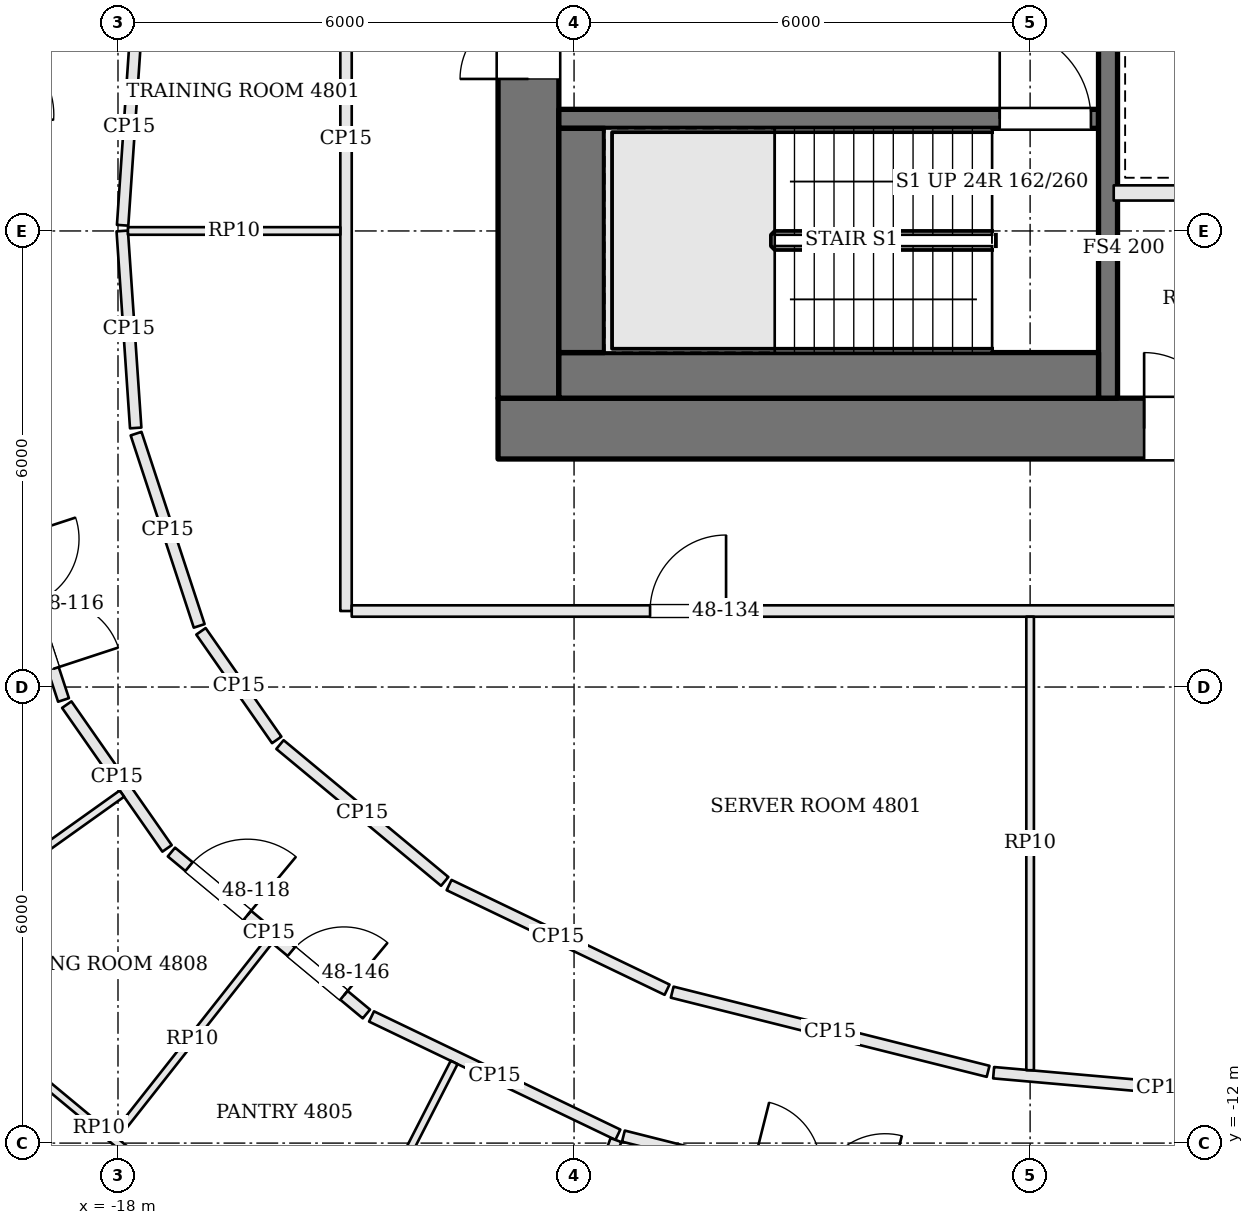
"""IFC4 building model, lengths in metres.
Left out: names, types, materials, properties, quantities, classifications, styles, units other than length and angle.
Written with IfcOpenShell. Run it as: python <this file> out.ifc"""

import sys

from ifc_helpers import new_model, si_unit, direction, frame, frame_2d, origin, place, context, subcontext, project, spatial, rectangle, extrude, element, fill, save


model = new_model("IFC4")
c1 = context("Model", 3, precision=1e-05, world=origin(), true_north=direction((0.0, 1.0)))
c2 = subcontext(c1, "Body", "Model", "MODEL_VIEW")
j1 = project(units=[si_unit("LENGTHUNIT", "METRE"), si_unit("PLANEANGLEUNIT", "RADIAN")], contexts=[c1])
p1 = place(None, origin())
s1 = spatial("IfcSite", under=j1, at=p1, CompositionType="ELEMENT")
p2 = place(p1, origin())
s2 = spatial("IfcBuilding", under=s1, at=p2, CompositionType="ELEMENT")
p3 = place(p2, frame((0.0, 0.0, 197.4)))
s3 = spatial("IfcBuildingStorey", under=s2, at=p3, CompositionType="ELEMENT", Elevation=197.4)
p4 = place(p3, frame((-13.0, -2.6, 0.0), z_axis=(0.0, 0.0, 1.0), x_axis=(1.0, 0.0, 0.0)))
e1 = element("IfcWall", 1, at=p4, inside=s3, PredefinedType="SHEAR", context=c2, shape_type="SweptSolid", body=[
    extrude(rectangle(XDim=26.0, YDim=0.8, at=frame_2d((13.0, 0.0))), origin(), (0.0, 0.0, 1.0), 3.9),
])
p5 = place(p4, frame((8.5, 0.0, 0.0)))
e2 = element("IfcOpeningElement", 2, at=p5, cuts=e1, PredefinedType="OPENING", context=c2, shape_type="SweptSolid", body=[
    extrude(rectangle(XDim=1.0, YDim=2.1, at=frame_2d((0.5, 1.05))), frame((0.0, 0.41, 0.0), z_axis=(0.0, -1.0, 0.0), x_axis=(1.0, 0.0, 0.0)), (0.0, 0.0, 1.0), 0.82),
])
p6 = place(p4, frame((11.025, 0.0, 0.0)))
e3 = element("IfcOpeningElement", 3, at=p6, cuts=e1, PredefinedType="OPENING", context=c2, shape_type="SweptSolid", body=[
    extrude(rectangle(XDim=0.9, YDim=2.1, at=frame_2d((0.45, 1.05))), frame((0.0, 0.41, 0.0), z_axis=(0.0, -1.0, 0.0), x_axis=(1.0, 0.0, 0.0)), (0.0, 0.0, 1.0), 0.82),
])
p7 = place(p4, frame((14.225, 0.0, 0.0)))
e4 = element("IfcOpeningElement", 4, at=p7, cuts=e1, PredefinedType="OPENING", context=c2, shape_type="SweptSolid", body=[
    extrude(rectangle(XDim=0.9, YDim=2.1, at=frame_2d((0.45, 1.05))), frame((0.0, 0.41, 0.0), z_axis=(0.0, -1.0, 0.0), x_axis=(1.0, 0.0, 0.0)), (0.0, 0.0, 1.0), 0.82),
])
p8 = place(p4, frame((16.6, 0.0, 0.0)))
e5 = element("IfcOpeningElement", 5, at=p8, cuts=e1, PredefinedType="OPENING", context=c2, shape_type="SweptSolid", body=[
    extrude(rectangle(XDim=1.0, YDim=2.1, at=frame_2d((0.5, 1.05))), frame((0.0, 0.41, 0.0), z_axis=(0.0, -1.0, 0.0), x_axis=(1.0, 0.0, 0.0)), (0.0, 0.0, 1.0), 0.82),
])
p9 = place(p3, frame((-12.6, -2.2, 0.0), z_axis=(0.0, 0.0, 1.0), x_axis=(0.0, 1.0, 0.0)))
e6 = element("IfcWall", 6, at=p9, inside=s3, PredefinedType="SHEAR", context=c2, shape_type="SweptSolid", body=[
    extrude(rectangle(XDim=13.4, YDim=0.8, at=frame_2d((6.7, 0.0))), origin(), (0.0, 0.0, 1.0), 3.9),
])
p10 = place(p9, frame((4.2, 0.0, 0.0)))
e7 = element("IfcOpeningElement", 7, at=p10, cuts=e6, PredefinedType="OPENING", context=c2, shape_type="SweptSolid", body=[
    extrude(rectangle(XDim=1.8, YDim=2.1, at=frame_2d((0.9, 1.05))), frame((0.0, 0.41, 0.0), z_axis=(0.0, -1.0, 0.0), x_axis=(1.0, 0.0, 0.0)), (0.0, 0.0, 1.0), 0.82),
])
p11 = place(p3, frame((-12.2, 1.475, 0.0), z_axis=(0.0, 0.0, 1.0), x_axis=(1.0, 0.0, 0.0)))
e8 = element("IfcWall", 8, at=p11, inside=s3, PredefinedType="SOLIDWALL", context=c2, shape_type="SweptSolid", body=[
    extrude(rectangle(XDim=7.1, YDim=0.25, at=frame_2d((3.55, 0.0))), origin(), (0.0, 0.0, 1.0), 3.7),
])
p12 = place(p11, frame((5.8, 0.0, 0.0)))
e9 = element("IfcOpeningElement", 9, at=p12, cuts=e8, PredefinedType="OPENING", context=c2, shape_type="SweptSolid", body=[
    extrude(rectangle(XDim=1.2, YDim=2.1, at=frame_2d((0.6, 1.05))), frame((0.0, 0.135, 0.0), z_axis=(0.0, -1.0, 0.0), x_axis=(1.0, 0.0, 0.0)), (0.0, 0.0, 1.0), 0.27),
])
p13 = place(p3, frame((-4.975, -2.2, 0.0), z_axis=(0.0, 0.0, 1.0), x_axis=(0.0, 1.0, 0.0)))
e10 = element("IfcWall", 10, at=p13, inside=s3, PredefinedType="SOLIDWALL", context=c2, shape_type="SweptSolid", body=[
    extrude(rectangle(XDim=13.4, YDim=0.25, at=frame_2d((6.7, 0.0))), origin(), (0.0, 0.0, 1.0), 3.7),
])
p14 = place(p13, frame((5.25, 0.0, 0.0)))
e11 = element("IfcOpeningElement", 11, at=p14, cuts=e10, PredefinedType="OPENING", context=c2, shape_type="SweptSolid", body=[
    extrude(rectangle(XDim=1.2, YDim=2.1, at=frame_2d((0.6, 1.05))), frame((0.0, 0.135, 0.0), z_axis=(0.0, -1.0, 0.0), x_axis=(1.0, 0.0, 0.0)), (0.0, 0.0, 1.0), 0.27),
])
p15 = place(p3, frame((-12.2, -1.9, 0.0), z_axis=(0.0, 0.0, 1.0), x_axis=(1.0, 0.0, 0.0)))
e12 = element("IfcWall", 12, at=p15, inside=s3, PredefinedType="SOLIDWALL", context=c2, shape_type="SweptSolid", body=[
    extrude(rectangle(XDim=7.1, YDim=0.6, at=frame_2d((3.55, 0.0))), origin(), (0.0, 0.0, 1.0), 3.7),
])
p16 = place(p3, frame((-11.9, -1.6, 0.0), z_axis=(0.0, 0.0, 1.0), x_axis=(0.0, 1.0, 0.0)))
e13 = element("IfcWall", 13, at=p16, inside=s3, PredefinedType="SOLIDWALL", context=c2, shape_type="SweptSolid", body=[
    extrude(rectangle(XDim=2.95, YDim=0.6, at=frame_2d((1.475, 0.0))), origin(), (0.0, 0.0, 1.0), 3.7),
])
p17 = place(p3, frame((-4.9, 0.5, 0.0), z_axis=(0.0, 0.0, 1.0), x_axis=(1.0, 0.0, 0.0)))
e14 = element("IfcWall", 14, at=p17, inside=s3, PredefinedType="SOLIDWALL", context=c2, shape_type="SweptSolid", body=[
    extrude(rectangle(XDim=9.8, YDim=0.2, at=frame_2d((4.9, 0.0))), origin(), (0.0, 0.0, 1.0), 3.7),
])
p18 = place(p3, frame((-19.677, -3.243, 0.0), z_axis=(0.0, 0.0, 1.0), x_axis=(0.311873272737, -0.950123708657, 0.0)))
e15 = element("IfcWall", 15, at=p18, inside=s3, PredefinedType="PARTITIONING", context=c2, shape_type="SweptSolid", body=[
    extrude(rectangle(XDim=3.08, YDim=0.15, at=frame_2d((1.54, 0.0))), origin(), (0.0, 0.0, 1.0), 3.084),
])
p19 = place(p18, frame((0.85, 0.0, 0.0)))
e16 = element("IfcOpeningElement", 16, at=p19, cuts=e15, PredefinedType="OPENING", context=c2, shape_type="SweptSolid", body=[
    extrude(rectangle(XDim=1.8, YDim=2.1, at=frame_2d((0.9, 1.05))), frame((0.0, 0.085, 0.0), z_axis=(0.0, -1.0, 0.0), x_axis=(1.0, 0.0, 0.0)), (0.0, 0.0, 1.0), 0.17),
])
p20 = place(p3, frame((-18.674, -6.232, 0.0), z_axis=(0.0, 0.0, 1.0), x_axis=(0.572118665737, -0.820170855563, 0.0)))
e17 = element("IfcWall", 17, at=p20, inside=s3, PredefinedType="PARTITIONING", context=c2, shape_type="SweptSolid", body=[
    extrude(rectangle(XDim=2.306, YDim=0.15, at=frame_2d((1.153, 0.0))), origin(), (0.0, 0.0, 1.0), 3.084),
])
p21 = place(p3, frame((-17.297, -8.171, 0.0), z_axis=(0.0, 0.0, 1.0), x_axis=(0.769228575061, -0.638973707839, 0.0)))
e18 = element("IfcWall", 18, at=p21, inside=s3, PredefinedType="PARTITIONING", context=c2, shape_type="SweptSolid", body=[
    extrude(rectangle(XDim=3.334, YDim=0.15, at=frame_2d((1.667, 0.0))), origin(), (0.0, 0.0, 1.0), 3.084),
])
p22 = place(p21, frame((0.3, 0.0, 0.0)))
e19 = element("IfcOpeningElement", 19, at=p22, cuts=e18, PredefinedType="OPENING", context=c2, shape_type="SweptSolid", body=[
    extrude(rectangle(XDim=1.0, YDim=2.4, at=frame_2d((0.5, 1.2))), frame((0.0, 0.085, 0.0), z_axis=(0.0, -1.0, 0.0), x_axis=(1.0, 0.0, 0.0)), (0.0, 0.0, 1.0), 0.17),
])
p23 = place(p21, frame((2.05, 0.0, 0.0)))
e20 = element("IfcOpeningElement", 20, at=p23, cuts=e18, PredefinedType="OPENING", context=c2, shape_type="SweptSolid", body=[
    extrude(rectangle(XDim=0.9, YDim=2.1, at=frame_2d((0.45, 1.05))), frame((0.0, 0.085, 0.0), z_axis=(0.0, -1.0, 0.0), x_axis=(1.0, 0.0, 0.0)), (0.0, 0.0, 1.0), 0.17),
])
p24 = place(p3, frame((-14.664, -10.334, 0.0), z_axis=(0.0, 0.0, 1.0), x_axis=(0.901523057468, -0.432731067585, 0.0)))
e21 = element("IfcWall", 21, at=p24, inside=s3, PredefinedType="PARTITIONING", context=c2, shape_type="SweptSolid", body=[
    extrude(rectangle(XDim=3.595, YDim=0.15, at=frame_2d((1.797, 0.0))), origin(), (0.0, 0.0, 1.0), 3.084),
])
p25 = place(p3, frame((-14.301, -19.789, 0.0), z_axis=(0.0, 0.0, 1.0), x_axis=(0.34224178248, 0.939611921128, 0.0)))
e22 = element("IfcWall", 22, at=p25, inside=s3, PredefinedType="PARTITIONING", context=c2, shape_type="SweptSolid", body=[
    extrude(rectangle(XDim=8.332, YDim=0.15, at=frame_2d((4.166, 0.0))), origin(), (0.0, 0.0, 1.0), 3.084),
])
p26 = place(p3, frame((-11.351, -11.908, 0.0), z_axis=(0.0, 0.0, 1.0), x_axis=(0.969630935796, -0.244572787421, 0.0)))
e23 = element("IfcWall", 23, at=p26, inside=s3, PredefinedType="PARTITIONING", context=c2, shape_type="SweptSolid", body=[
    extrude(rectangle(XDim=4.68, YDim=0.15, at=frame_2d((2.34, 0.0))), origin(), (0.0, 0.0, 1.0), 3.084),
])
p27 = place(p26, frame((1.751, 0.0, 0.0)))
e24 = element("IfcOpeningElement", 24, at=p27, cuts=e23, PredefinedType="OPENING", context=c2, shape_type="SweptSolid", body=[
    extrude(rectangle(XDim=1.8, YDim=2.1, at=frame_2d((0.9, 1.05))), frame((0.0, 0.085, 0.0), z_axis=(0.0, -1.0, 0.0), x_axis=(1.0, 0.0, 0.0)), (0.0, 0.0, 1.0), 0.17),
])
p28 = place(p3, frame((-2.039, -11.465, 0.0), z_axis=(0.0, 0.0, 1.0), x_axis=(-0.996139855484, 0.087780341286, 0.0)))
e25 = element("IfcWall", 25, at=p28, inside=s3, PredefinedType="PARTITIONING", context=c2, shape_type="SweptSolid", body=[
    extrude(rectangle(XDim=4.458, YDim=0.15, at=frame_2d((2.229, 0.0))), origin(), (0.0, 0.0, 1.0), 3.084),
])
p29 = place(p3, frame((-6.553, -11.056, 0.0), z_axis=(0.0, 0.0, 1.0), x_axis=(-0.970004917182, 0.243085294995, 0.0)))
e26 = element("IfcWall", 26, at=p29, inside=s3, PredefinedType="PARTITIONING", context=c2, shape_type="SweptSolid", body=[
    extrude(rectangle(XDim=4.284, YDim=0.15, at=frame_2d((2.142, 0.0))), origin(), (0.0, 0.0, 1.0), 3.084),
])
p30 = place(p3, frame((-10.776, -9.982, 0.0), z_axis=(0.0, 0.0, 1.0), x_axis=(-0.901511079436, 0.432756020933, 0.0)))
e27 = element("IfcWall", 27, at=p30, inside=s3, PredefinedType="PARTITIONING", context=c2, shape_type="SweptSolid", body=[
    extrude(rectangle(XDim=3.181, YDim=0.15, at=frame_2d((1.59, 0.0))), origin(), (0.0, 0.0, 1.0), 3.084),
])
p31 = place(p3, frame((-13.702, -8.557, 0.0), z_axis=(0.0, 0.0, 1.0), x_axis=(-0.769221825067, 0.638981833733, 0.0)))
e28 = element("IfcWall", 28, at=p31, inside=s3, PredefinedType="PARTITIONING", context=c2, shape_type="SweptSolid", body=[
    extrude(rectangle(XDim=2.817, YDim=0.15, at=frame_2d((1.409, 0.0))), origin(), (0.0, 0.0, 1.0), 3.084),
])
p32 = place(p3, frame((-15.912, -6.696, 0.0), z_axis=(0.0, 0.0, 1.0), x_axis=(-0.572078533763, 0.820198848578, 0.0)))
e29 = element("IfcWall", 29, at=p32, inside=s3, PredefinedType="PARTITIONING", context=c2, shape_type="SweptSolid", body=[
    extrude(rectangle(XDim=1.742, YDim=0.15, at=frame_2d((0.871, 0.0))), origin(), (0.0, 0.0, 1.0), 3.084),
])
p33 = place(p3, frame((-16.932, -5.196, 0.0), z_axis=(0.0, 0.0, 1.0), x_axis=(-0.311904957484, 0.950113307715, 0.0)))
e30 = element("IfcWall", 30, at=p33, inside=s3, PredefinedType="PARTITIONING", context=c2, shape_type="SweptSolid", body=[
    extrude(rectangle(XDim=2.662, YDim=0.15, at=frame_2d((1.331, 0.0))), origin(), (0.0, 0.0, 1.0), 3.084),
])
p34 = place(p3, frame((-17.767, -2.592, 0.0), z_axis=(0.0, 0.0, 1.0), x_axis=(-0.068140828228, 0.997675712608, 0.0)))
e31 = element("IfcWall", 31, at=p34, inside=s3, PredefinedType="PARTITIONING", context=c2, shape_type="SweptSolid", body=[
    extrude(rectangle(XDim=2.598, YDim=0.15, at=frame_2d((1.299, 0.0))), origin(), (0.0, 0.0, 1.0), 3.084),
])
p35 = place(p3, frame((-17.939, 0.075, 0.0), z_axis=(0.0, 0.0, 1.0), x_axis=(0.068227980697, 0.997669756307, 0.0)))
e32 = element("IfcWall", 32, at=p35, inside=s3, PredefinedType="PARTITIONING", context=c2, shape_type="SweptSolid", body=[
    extrude(rectangle(XDim=2.598, YDim=0.15, at=frame_2d((1.299, 0.0))), origin(), (0.0, 0.0, 1.0), 3.084),
])
p36 = place(p3, frame((-15.0, 7.423, 0.0), z_axis=(0.0, 0.0, 1.0), x_axis=(0.0, -1.0, 0.0)))
e33 = element("IfcWall", 33, at=p36, inside=s3, PredefinedType="PARTITIONING", context=c2, shape_type="SweptSolid", body=[
    extrude(rectangle(XDim=12.423, YDim=0.15, at=frame_2d((6.211, 0.0))), origin(), (0.0, 0.0, 1.0), 3.084),
])
p37 = place(p36, frame((3.174, 0.0, 0.0)))
e34 = element("IfcOpeningElement", 34, at=p37, cuts=e33, PredefinedType="OPENING", context=c2, shape_type="SweptSolid", body=[
    extrude(rectangle(XDim=1.0, YDim=2.1, at=frame_2d((0.5, 1.05))), frame((0.0, 0.085, 0.0), z_axis=(0.0, -1.0, 0.0), x_axis=(1.0, 0.0, 0.0)), (0.0, 0.0, 1.0), 0.17),
])
p38 = place(p3, frame((-14.925, -5.0, 0.0), z_axis=(0.0, 0.0, 1.0), x_axis=(1.0, 0.0, 0.0)))
e35 = element("IfcWall", 35, at=p38, inside=s3, PredefinedType="PARTITIONING", context=c2, shape_type="SweptSolid", body=[
    extrude(rectangle(XDim=29.925, YDim=0.15, at=frame_2d((14.962, 0.0))), origin(), (0.0, 0.0, 1.0), 3.084),
])
p39 = place(p38, frame((3.925, 0.0, 0.0)))
e36 = element("IfcOpeningElement", 36, at=p39, cuts=e35, PredefinedType="OPENING", context=c2, shape_type="SweptSolid", body=[
    extrude(rectangle(XDim=1.0, YDim=2.1, at=frame_2d((0.5, 1.05))), frame((0.0, 0.085, 0.0), z_axis=(0.0, -1.0, 0.0), x_axis=(1.0, 0.0, 0.0)), (0.0, 0.0, 1.0), 0.17),
])
p40 = place(p38, frame((14.025, 0.0, 0.0)))
e37 = element("IfcOpeningElement", 37, at=p40, cuts=e35, PredefinedType="OPENING", context=c2, shape_type="SweptSolid", body=[
    extrude(rectangle(XDim=1.8, YDim=2.1, at=frame_2d((0.9, 1.05))), frame((0.0, 0.085, 0.0), z_axis=(0.0, -1.0, 0.0), x_axis=(1.0, 0.0, 0.0)), (0.0, 0.0, 1.0), 0.17),
])
p41 = place(p38, frame((24.925, 0.0, 0.0)))
e38 = element("IfcOpeningElement", 38, at=p41, cuts=e35, PredefinedType="OPENING", context=c2, shape_type="SweptSolid", body=[
    extrude(rectangle(XDim=1.0, YDim=2.1, at=frame_2d((0.5, 1.05))), frame((0.0, 0.085, 0.0), z_axis=(0.0, -1.0, 0.0), x_axis=(1.0, 0.0, 0.0)), (0.0, 0.0, 1.0), 0.17),
])
p42 = place(p3, frame((-16.62, -13.153, 0.0), z_axis=(0.0, 0.0, 1.0), x_axis=(-0.76922129881, 0.638982467253, 0.0)))
e39 = element("IfcWall", 39, at=p42, inside=s3, PredefinedType="PARTITIONING", context=c2, shape_type="SweptSolid", body=[
    extrude(rectangle(XDim=4.238, YDim=0.1, at=frame_2d((2.119, 0.0))), origin(), (0.0, 0.0, 1.0), 3.084),
])
p43 = place(p3, frame((-17.949, -7.403, 0.0), z_axis=(0.0, 0.0, 1.0), x_axis=(-0.814111063542, -0.58070920108, 0.0)))
e40 = element("IfcWall", 40, at=p43, inside=s3, PredefinedType="PARTITIONING", context=c2, shape_type="SweptSolid", body=[
    extrude(rectangle(XDim=3.275, YDim=0.1, at=frame_2d((1.638, 0.0))), origin(), (0.0, 0.0, 1.0), 3.084),
])
p44 = place(p3, frame((-16.009, -9.338, 0.0), z_axis=(0.0, 0.0, 1.0), x_axis=(-0.619071458302, -0.785334660839, 0.0)))
e41 = element("IfcWall", 41, at=p44, inside=s3, PredefinedType="PARTITIONING", context=c2, shape_type="SweptSolid", body=[
    extrude(rectangle(XDim=3.276, YDim=0.1, at=frame_2d((1.638, 0.0))), origin(), (0.0, 0.0, 1.0), 3.084),
])
p45 = place(p3, frame((-13.578, -10.939, 0.0), z_axis=(0.0, 0.0, 1.0), x_axis=(-0.455540357247, -0.890215132942, 0.0)))
e42 = element("IfcWall", 42, at=p45, inside=s3, PredefinedType="PARTITIONING", context=c2, shape_type="SweptSolid", body=[
    extrude(rectangle(XDim=3.276, YDim=0.1, at=frame_2d((1.638, 0.0))), origin(), (0.0, 0.0, 1.0), 3.084),
])
p46 = place(p3, frame((-6.0, -11.041, 0.0), z_axis=(0.0, 0.0, 1.0), x_axis=(0.0, 1.0, 0.0)))
e43 = element("IfcWall", 43, at=p46, inside=s3, PredefinedType="PARTITIONING", context=c2, shape_type="SweptSolid", body=[
    extrude(rectangle(XDim=5.966, YDim=0.1, at=frame_2d((2.983, 0.0))), origin(), (0.0, 0.0, 1.0), 3.084),
])
p47 = place(p3, frame((-17.869, 0.0, 0.0), z_axis=(0.0, 0.0, 1.0), x_axis=(1.0, 0.0, 0.0)))
e44 = element("IfcWall", 44, at=p47, inside=s3, PredefinedType="PARTITIONING", context=c2, shape_type="SweptSolid", body=[
    extrude(rectangle(XDim=2.794, YDim=0.1, at=frame_2d((1.397, 0.0))), origin(), (0.0, 0.0, 1.0), 3.084),
])
p48 = place(p10, origin())
e45 = element("IfcDoor", 45, at=p48, inside=s3, OperationType="DOUBLE_DOOR_SINGLE_SWING", PredefinedType="DOOR", context=c2, shape_type="SweptSolid", body=[
    extrude(rectangle(XDim=1.8, YDim=2.1, at=frame_2d((0.9, 1.05))), frame((0.0, 0.025, 0.0), z_axis=(0.0, -1.0, 0.0), x_axis=(1.0, 0.0, 0.0)), (0.0, 0.0, 1.0), 0.05),
])
fill(e7, e45)
p49 = place(p12, origin())
e46 = element("IfcDoor", 46, at=p49, inside=s3, OperationType="SINGLE_SWING_LEFT", PredefinedType="DOOR", context=c2, shape_type="SweptSolid", body=[
    extrude(rectangle(XDim=1.2, YDim=2.1, at=frame_2d((0.6, 1.05))), frame((0.0, 0.025, 0.0), z_axis=(0.0, -1.0, 0.0), x_axis=(1.0, 0.0, 0.0)), (0.0, 0.0, 1.0), 0.05),
])
fill(e9, e46)
p50 = place(p5, origin())
e47 = element("IfcDoor", 47, at=p50, inside=s3, OperationType="SINGLE_SWING_LEFT", PredefinedType="DOOR", context=c2, shape_type="SweptSolid", body=[
    extrude(rectangle(XDim=1.0, YDim=2.1, at=frame_2d((0.5, 1.05))), frame((0.0, 0.025, 0.0), z_axis=(0.0, -1.0, 0.0), x_axis=(1.0, 0.0, 0.0)), (0.0, 0.0, 1.0), 0.05),
])
fill(e2, e47)
p51 = place(p19, origin())
e48 = element("IfcDoor", 48, at=p51, inside=s3, OperationType="DOUBLE_DOOR_SINGLE_SWING", PredefinedType="DOOR", context=c2, shape_type="SweptSolid", body=[
    extrude(rectangle(XDim=1.8, YDim=2.1, at=frame_2d((0.9, 1.05))), frame((0.0, 0.025, 0.0), z_axis=(0.0, -1.0, 0.0), x_axis=(1.0, 0.0, 0.0)), (0.0, 0.0, 1.0), 0.05),
])
fill(e16, e48)
p52 = place(p22, origin())
e49 = element("IfcDoor", 49, at=p52, inside=s3, OperationType="SINGLE_SWING_RIGHT", PredefinedType="DOOR", context=c2, shape_type="SweptSolid", body=[
    extrude(rectangle(XDim=1.0, YDim=2.4, at=frame_2d((0.5, 1.2))), frame((0.0, 0.025, 0.0), z_axis=(0.0, -1.0, 0.0), x_axis=(1.0, 0.0, 0.0)), (0.0, 0.0, 1.0), 0.05),
])
fill(e19, e49)
p53 = place(p39, origin())
e50 = element("IfcDoor", 50, at=p53, inside=s3, OperationType="SINGLE_SWING_RIGHT", PredefinedType="DOOR", context=c2, shape_type="SweptSolid", body=[
    extrude(rectangle(XDim=1.0, YDim=2.1, at=frame_2d((0.5, 1.05))), frame((0.0, 0.025, 0.0), z_axis=(0.0, -1.0, 0.0), x_axis=(1.0, 0.0, 0.0)), (0.0, 0.0, 1.0), 0.05),
])
fill(e36, e50)
p54 = place(p23, origin())
e51 = element("IfcDoor", 51, at=p54, inside=s3, OperationType="SINGLE_SWING_RIGHT", PredefinedType="DOOR", context=c2, shape_type="SweptSolid", body=[
    extrude(rectangle(XDim=0.9, YDim=2.1, at=frame_2d((0.45, 1.05))), frame((0.0, 0.025, 0.0), z_axis=(0.0, -1.0, 0.0), x_axis=(1.0, 0.0, 0.0)), (0.0, 0.0, 1.0), 0.05),
])
fill(e20, e51)
save(model, sys.argv[1])
